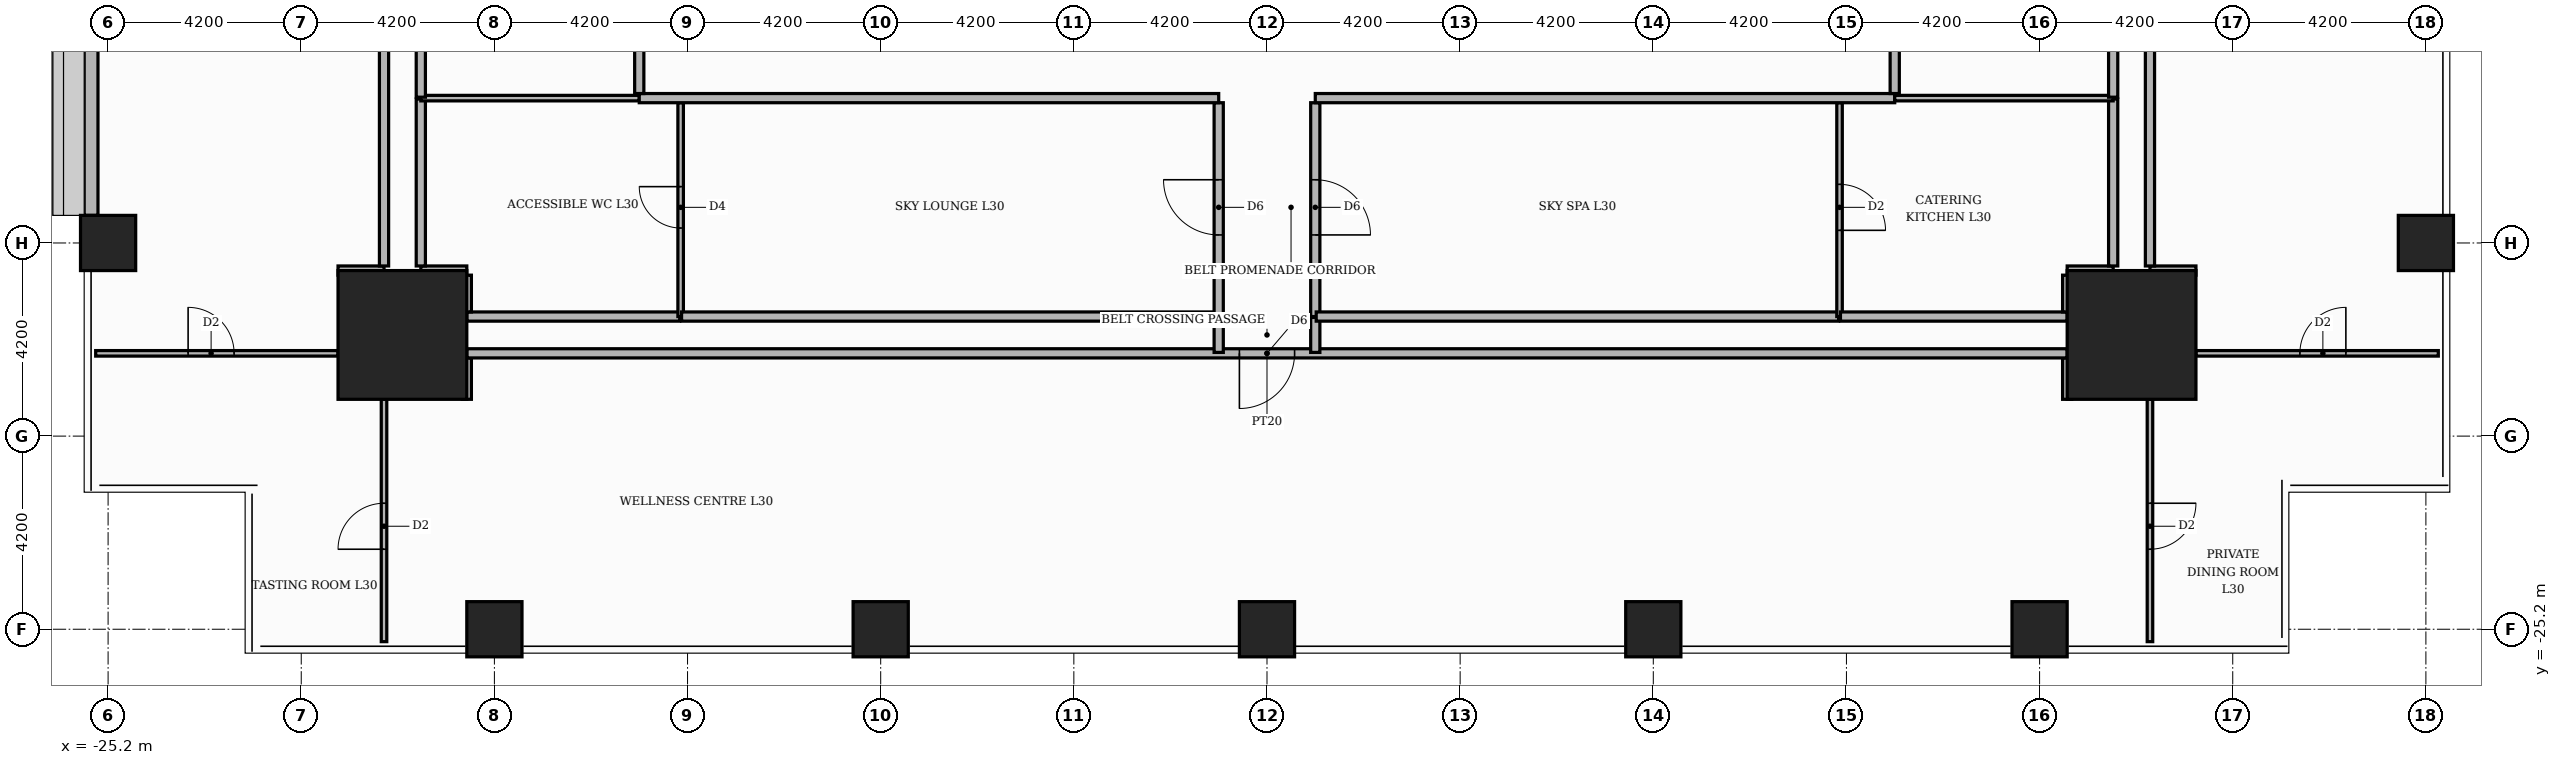
"""IFC4 building model, lengths in metres.
Left out: names, types, materials, properties, quantities, classifications, styles, units other than length and angle.
Written with IfcOpenShell. Run it as: python <this file> out.ifc"""

import sys

from ifc_helpers import new_model, si_unit, direction, frame, frame_2d, origin, origin_2d, place, context, subcontext, project, spatial, rectangle, extrude, element, fill, save


model = new_model("IFC4")
c1 = context("Model", 3, precision=1e-05, world=origin(), true_north=direction((0.0, 1.0)))
c2 = subcontext(c1, "Body", "Model", "MODEL_VIEW")
j1 = project(units=[si_unit("LENGTHUNIT", "METRE"), si_unit("PLANEANGLEUNIT", "RADIAN")], contexts=[c1])
p1 = place(None, origin())
s1 = spatial("IfcSite", under=j1, at=p1, CompositionType="ELEMENT")
p2 = place(p1, origin())
s2 = spatial("IfcBuilding", under=s1, at=p2, CompositionType="ELEMENT")
p3 = place(p2, frame((0.0, 0.0, 126.0)))
s3 = spatial("IfcBuildingStorey", under=s2, at=p3, CompositionType="ELEMENT", Elevation=126.0)
for number, where, z_axis, x_axis in (
    (1, (18.8, -18.8, 0.0), (0.0, 0.0, 1.0), (1.0, 0.0, 0.0)),
    (2, (-18.8, -18.8, 0.0), (0.0, 0.0, 1.0), (1.0, 0.0, 0.0)),
):
    element("IfcColumn", number, at=place(p3, frame(where, z_axis=z_axis, x_axis=x_axis)), inside=s3, PredefinedType="COLUMN", context=c2, shape_type="SweptSolid", body=[
        extrude(rectangle(XDim=2.8, YDim=2.8, at=origin_2d()), origin(), (0.0, 0.0, 1.0), 7.8),
    ])
for number, where, z_axis, x_axis in (
    (3, (25.2, -16.8, 0.0), (0.0, 0.0, 1.0), (1.0, 0.0, 0.0)),
    (4, (0.0, -25.2, 0.0), (0.0, 0.0, 1.0), (1.0, 0.0, 0.0)),
    (5, (8.4, -25.2, 0.0), (0.0, 0.0, 1.0), (1.0, 0.0, 0.0)),
    (6, (16.8, -25.2, 0.0), (0.0, 0.0, 1.0), (1.0, 0.0, 0.0)),
    (7, (-8.4, -25.2, 0.0), (0.0, 0.0, 1.0), (1.0, 0.0, 0.0)),
    (8, (-16.8, -25.2, 0.0), (0.0, 0.0, 1.0), (1.0, 0.0, 0.0)),
    (9, (-25.2, -16.8, 0.0), (0.0, 0.0, 1.0), (1.0, 0.0, 0.0)),
):
    element("IfcColumn", number, at=place(p3, frame(where, z_axis=z_axis, x_axis=x_axis)), inside=s3, PredefinedType="COLUMN", context=c2, shape_type="SweptSolid", body=[
        extrude(rectangle(XDim=1.2, YDim=1.2, at=origin_2d()), origin(), (0.0, 0.0, 1.0), 7.8),
    ])
p4 = place(p3, frame((-25.57, 16.2, 0.0), z_axis=(0.0, 0.0, 1.0), x_axis=(0.0, -1.0, 0.0)))
e10 = element("IfcWall", 10, at=p4, inside=s3, PredefinedType="STANDARD", context=c2, shape_type="SweptSolid", body=[
    extrude(rectangle(XDim=32.4, YDim=0.3, at=frame_2d((16.2, 0.0))), origin(), (0.0, 0.0, 1.0), 7.38),
])
p5 = place(p3, frame((-19.2, -25.47, 0.0), z_axis=(0.0, 0.0, 1.0), x_axis=(0.0, 1.0, 0.0)))
e11 = element("IfcWall", 11, at=p5, inside=s3, PredefinedType="PARTITIONING", context=c2, shape_type="SweptSolid", body=[
    extrude(rectangle(XDim=5.27, YDim=0.12, at=frame_2d((2.635, 0.0))), origin(), (0.0, 0.0, 1.0), 7.38),
])
p6 = place(p5, frame((2.01, 0.0, 0.0)))
e12 = element("IfcOpeningElement", 12, at=p6, cuts=e11, PredefinedType="OPENING", context=c2, shape_type="SweptSolid", body=[
    extrude(rectangle(XDim=1.0, YDim=2.1, at=frame_2d((0.5, 1.05))), frame((0.0, 0.07, 0.0), z_axis=(0.0, -1.0, 0.0), x_axis=(1.0, 0.0, 0.0)), (0.0, 0.0, 1.0), 0.14),
])
p7 = place(p3, frame((19.2, -25.47, 0.0), z_axis=(0.0, 0.0, 1.0), x_axis=(0.0, 1.0, 0.0)))
e13 = element("IfcWall", 13, at=p7, inside=s3, PredefinedType="PARTITIONING", context=c2, shape_type="SweptSolid", body=[
    extrude(rectangle(XDim=5.27, YDim=0.12, at=frame_2d((2.635, 0.0))), origin(), (0.0, 0.0, 1.0), 7.38),
])
p8 = place(p7, frame((2.01, 0.0, 0.0)))
e14 = element("IfcOpeningElement", 14, at=p8, cuts=e13, PredefinedType="OPENING", context=c2, shape_type="SweptSolid", body=[
    extrude(rectangle(XDim=1.0, YDim=2.1, at=frame_2d((0.5, 1.05))), frame((0.0, 0.07, 0.0), z_axis=(0.0, -1.0, 0.0), x_axis=(1.0, 0.0, 0.0)), (0.0, 0.0, 1.0), 0.14),
])
for number, where, z_axis, x_axis in (
    (15, (-17.4, -20.2, 0.0), (0.0, 0.0, 1.0), (0.0, 1.0, 0.0)),
    (16, (17.4, -20.2, 0.0), (0.0, 0.0, 1.0), (0.0, 1.0, 0.0)),
):
    element("IfcWall", number, at=place(p3, frame(where, z_axis=z_axis, x_axis=x_axis)), inside=s3, PredefinedType="PARTITIONING", context=c2, shape_type="SweptSolid", body=[
        extrude(rectangle(XDim=0.9, YDim=0.2, at=frame_2d((0.45, 0.0))), origin(), (0.0, 0.0, 1.0), 7.38),
    ])
p9 = place(p3, frame((-25.47, -19.2, 0.0), z_axis=(0.0, 0.0, 1.0), x_axis=(1.0, 0.0, 0.0)))
e17 = element("IfcWall", 17, at=p9, inside=s3, PredefinedType="PARTITIONING", context=c2, shape_type="SweptSolid", body=[
    extrude(rectangle(XDim=5.27, YDim=0.12, at=frame_2d((2.635, 0.0))), origin(), (0.0, 0.0, 1.0), 7.38),
])
p10 = place(p9, frame((2.01, 0.0, 0.0)))
e18 = element("IfcOpeningElement", 18, at=p10, cuts=e17, PredefinedType="OPENING", context=c2, shape_type="SweptSolid", body=[
    extrude(rectangle(XDim=1.0, YDim=2.1, at=frame_2d((0.5, 1.05))), frame((0.0, 0.07, 0.0), z_axis=(0.0, -1.0, 0.0), x_axis=(1.0, 0.0, 0.0)), (0.0, 0.0, 1.0), 0.14),
])
p11 = place(p3, frame((-17.4, -19.2, 0.0), z_axis=(0.0, 0.0, 1.0), x_axis=(1.0, 0.0, 0.0)))
e19 = element("IfcWall", 19, at=p11, inside=s3, PredefinedType="PARTITIONING", context=c2, shape_type="SweptSolid", body=[
    extrude(rectangle(XDim=34.8, YDim=0.2, at=frame_2d((17.4, 0.0))), origin(), (0.0, 0.0, 1.0), 7.38),
])
p12 = place(p11, frame((16.8, 0.0, 0.0)))
e20 = element("IfcOpeningElement", 20, at=p12, cuts=e19, PredefinedType="OPENING", context=c2, shape_type="SweptSolid", body=[
    extrude(rectangle(XDim=1.2, YDim=2.1, at=frame_2d((0.6, 1.05))), frame((0.0, 0.11, 0.0), z_axis=(0.0, -1.0, 0.0), x_axis=(1.0, 0.0, 0.0)), (0.0, 0.0, 1.0), 0.22),
])
p13 = place(p3, frame((20.2, -19.2, 0.0), z_axis=(0.0, 0.0, 1.0), x_axis=(1.0, 0.0, 0.0)))
e21 = element("IfcWall", 21, at=p13, inside=s3, PredefinedType="PARTITIONING", context=c2, shape_type="SweptSolid", body=[
    extrude(rectangle(XDim=5.27, YDim=0.12, at=frame_2d((2.635, 0.0))), origin(), (0.0, 0.0, 1.0), 7.38),
])
p14 = place(p13, frame((2.26, 0.0, 0.0)))
e22 = element("IfcOpeningElement", 22, at=p14, cuts=e21, PredefinedType="OPENING", context=c2, shape_type="SweptSolid", body=[
    extrude(rectangle(XDim=1.0, YDim=2.1, at=frame_2d((0.5, 1.05))), frame((0.0, 0.07, 0.0), z_axis=(0.0, -1.0, 0.0), x_axis=(1.0, 0.0, 0.0)), (0.0, 0.0, 1.0), 0.14),
])
for number, where, z_axis, x_axis in (
    (23, (-1.05, -19.18, 0.0), (0.0, 0.0, 1.0), (0.0, 1.0, 0.0)),
    (24, (1.05, -19.18, 0.0), (0.0, 0.0, 1.0), (0.0, 1.0, 0.0)),
):
    element("IfcWall", number, at=place(p3, frame(where, z_axis=z_axis, x_axis=x_axis)), inside=s3, PredefinedType="PARTITIONING", context=c2, shape_type="SweptSolid", body=[
        extrude(rectangle(XDim=0.76, YDim=0.2, at=frame_2d((0.38, 0.0))), origin(), (0.0, 0.0, 1.0), 7.38),
    ])
p15 = place(p3, frame((-17.4, -18.4, 0.0), z_axis=(0.0, 0.0, 1.0), x_axis=(1.0, 0.0, 0.0)))
e25 = element("IfcWall", 25, at=p15, inside=s3, PredefinedType="PARTITIONING", context=c2, shape_type="SweptSolid", body=[
    extrude(rectangle(XDim=4.63, YDim=0.2, at=frame_2d((2.315, 0.0))), origin(), (0.0, 0.0, 1.0), 7.38),
])
p16 = place(p3, frame((-12.75, -18.4, 0.0), z_axis=(0.0, 0.0, 1.0), x_axis=(0.0, 1.0, 0.0)))
e26 = element("IfcWall", 26, at=p16, inside=s3, PredefinedType="PARTITIONING", context=c2, shape_type="SweptSolid", body=[
    extrude(rectangle(XDim=4.65, YDim=0.12, at=frame_2d((2.325, 0.0))), origin(), (0.0, 0.0, 1.0), 7.38),
])
p17 = place(p16, frame((1.925, 0.0, 0.0)))
e27 = element("IfcOpeningElement", 27, at=p17, cuts=e26, PredefinedType="OPENING", context=c2, shape_type="SweptSolid", body=[
    extrude(rectangle(XDim=0.9, YDim=2.1, at=frame_2d((0.45, 1.05))), frame((0.0, 0.07, 0.0), z_axis=(0.0, -1.0, 0.0), x_axis=(1.0, 0.0, 0.0)), (0.0, 0.0, 1.0), 0.14),
])
p18 = place(p3, frame((-12.73, -18.4, 0.0), z_axis=(0.0, 0.0, 1.0), x_axis=(1.0, 0.0, 0.0)))
e28 = element("IfcWall", 28, at=p18, inside=s3, PredefinedType="PARTITIONING", context=c2, shape_type="SweptSolid", body=[
    extrude(rectangle(XDim=11.66, YDim=0.2, at=frame_2d((5.83, 0.0))), origin(), (0.0, 0.0, 1.0), 7.38),
])
p19 = place(p3, frame((-1.05, -18.4, 0.0), z_axis=(0.0, 0.0, 1.0), x_axis=(0.0, 1.0, 0.0)))
e29 = element("IfcWall", 29, at=p19, inside=s3, PredefinedType="PARTITIONING", context=c2, shape_type="SweptSolid", body=[
    extrude(rectangle(XDim=4.65, YDim=0.2, at=frame_2d((2.325, 0.0))), origin(), (0.0, 0.0, 1.0), 7.38),
])
p20 = place(p19, frame((1.775, 0.0, 0.0)))
e30 = element("IfcOpeningElement", 30, at=p20, cuts=e29, PredefinedType="OPENING", context=c2, shape_type="SweptSolid", body=[
    extrude(rectangle(XDim=1.2, YDim=2.1, at=frame_2d((0.6, 1.05))), frame((0.0, 0.11, 0.0), z_axis=(0.0, -1.0, 0.0), x_axis=(1.0, 0.0, 0.0)), (0.0, 0.0, 1.0), 0.22),
])
p21 = place(p3, frame((1.05, -18.4, 0.0), z_axis=(0.0, 0.0, 1.0), x_axis=(0.0, 1.0, 0.0)))
e31 = element("IfcWall", 31, at=p21, inside=s3, PredefinedType="PARTITIONING", context=c2, shape_type="SweptSolid", body=[
    extrude(rectangle(XDim=4.65, YDim=0.2, at=frame_2d((2.325, 0.0))), origin(), (0.0, 0.0, 1.0), 7.38),
])
p22 = place(p21, frame((1.775, 0.0, 0.0)))
e32 = element("IfcOpeningElement", 32, at=p22, cuts=e31, PredefinedType="OPENING", context=c2, shape_type="SweptSolid", body=[
    extrude(rectangle(XDim=1.2, YDim=2.1, at=frame_2d((0.6, 1.05))), frame((0.0, 0.11, 0.0), z_axis=(0.0, -1.0, 0.0), x_axis=(1.0, 0.0, 0.0)), (0.0, 0.0, 1.0), 0.22),
])
p23 = place(p3, frame((1.07, -18.4, 0.0), z_axis=(0.0, 0.0, 1.0), x_axis=(1.0, 0.0, 0.0)))
e33 = element("IfcWall", 33, at=p23, inside=s3, PredefinedType="PARTITIONING", context=c2, shape_type="SweptSolid", body=[
    extrude(rectangle(XDim=11.36, YDim=0.2, at=frame_2d((5.68, 0.0))), origin(), (0.0, 0.0, 1.0), 7.38),
])
p24 = place(p3, frame((12.45, -18.4, 0.0), z_axis=(0.0, 0.0, 1.0), x_axis=(0.0, 1.0, 0.0)))
e34 = element("IfcWall", 34, at=p24, inside=s3, PredefinedType="PARTITIONING", context=c2, shape_type="SweptSolid", body=[
    extrude(rectangle(XDim=4.65, YDim=0.12, at=frame_2d((2.325, 0.0))), origin(), (0.0, 0.0, 1.0), 7.38),
])
p25 = place(p24, frame((1.875, 0.0, 0.0)))
e35 = element("IfcOpeningElement", 35, at=p25, cuts=e34, PredefinedType="OPENING", context=c2, shape_type="SweptSolid", body=[
    extrude(rectangle(XDim=1.0, YDim=2.1, at=frame_2d((0.5, 1.05))), frame((0.0, 0.07, 0.0), z_axis=(0.0, -1.0, 0.0), x_axis=(1.0, 0.0, 0.0)), (0.0, 0.0, 1.0), 0.14),
])
p26 = place(p3, frame((12.47, -18.4, 0.0), z_axis=(0.0, 0.0, 1.0), x_axis=(1.0, 0.0, 0.0)))
e36 = element("IfcWall", 36, at=p26, inside=s3, PredefinedType="PARTITIONING", context=c2, shape_type="SweptSolid", body=[
    extrude(rectangle(XDim=4.93, YDim=0.2, at=frame_2d((2.465, 0.0))), origin(), (0.0, 0.0, 1.0), 7.38),
])
for number, where, z_axis, x_axis in (
    (37, (-17.4, -18.3, 0.0), (0.0, 0.0, 1.0), (0.0, 1.0, 0.0)),
    (38, (17.4, -18.3, 0.0), (0.0, 0.0, 1.0), (0.0, 1.0, 0.0)),
):
    element("IfcWall", number, at=place(p3, frame(where, z_axis=z_axis, x_axis=x_axis)), inside=s3, PredefinedType="PARTITIONING", context=c2, shape_type="SweptSolid", body=[
        extrude(rectangle(XDim=0.8, YDim=0.2, at=frame_2d((0.4, 0.0))), origin(), (0.0, 0.0, 1.0), 7.38),
    ])
for number, where, z_axis, x_axis in (
    (39, (-20.2, -17.4, 0.0), (0.0, 0.0, 1.0), (1.0, 0.0, 0.0)),
    (40, (-18.4, -17.4, 0.0), (0.0, 0.0, 1.0), (1.0, 0.0, 0.0)),
    (41, (17.4, -17.4, 0.0), (0.0, 0.0, 1.0), (1.0, 0.0, 0.0)),
    (42, (19.2, -17.4, 0.0), (0.0, 0.0, 1.0), (1.0, 0.0, 0.0)),
):
    element("IfcWall", number, at=place(p3, frame(where, z_axis=z_axis, x_axis=x_axis)), inside=s3, PredefinedType="PARTITIONING", context=c2, shape_type="SweptSolid", body=[
        extrude(rectangle(XDim=1.0, YDim=0.2, at=frame_2d((0.5, 0.0))), origin(), (0.0, 0.0, 1.0), 7.38),
    ])
p27 = place(p3, frame((-19.2, -17.3, 0.0), z_axis=(0.0, 0.0, 1.0), x_axis=(0.0, 1.0, 0.0)))
e43 = element("IfcWall", 43, at=p27, inside=s3, PredefinedType="PARTITIONING", context=c2, shape_type="SweptSolid", body=[
    extrude(rectangle(XDim=13.08, YDim=0.2, at=frame_2d((6.54, 0.0))), origin(), (0.0, 0.0, 1.0), 7.38),
])
for number, where, z_axis, x_axis in (
    (44, (-18.4, -17.3, 0.0), (0.0, 0.0, 1.0), (0.0, 1.0, 0.0)),
    (45, (18.4, -17.3, 0.0), (0.0, 0.0, 1.0), (0.0, 1.0, 0.0)),
):
    element("IfcWall", number, at=place(p3, frame(where, z_axis=z_axis, x_axis=x_axis)), inside=s3, PredefinedType="PARTITIONING", context=c2, shape_type="SweptSolid", body=[
        extrude(rectangle(XDim=3.63, YDim=0.2, at=frame_2d((1.815, 0.0))), origin(), (0.0, 0.0, 1.0), 7.38),
    ])
p28 = place(p3, frame((19.2, -17.3, 0.0), z_axis=(0.0, 0.0, 1.0), x_axis=(0.0, 1.0, 0.0)))
e46 = element("IfcWall", 46, at=p28, inside=s3, PredefinedType="PARTITIONING", context=c2, shape_type="SweptSolid", body=[
    extrude(rectangle(XDim=34.6, YDim=0.2, at=frame_2d((17.3, 0.0))), origin(), (0.0, 0.0, 1.0), 7.38),
])
p29 = place(p3, frame((-18.4, -13.65, 0.0), z_axis=(0.0, 0.0, 1.0), x_axis=(1.0, 0.0, 0.0)))
e47 = element("IfcWall", 47, at=p29, inside=s3, PredefinedType="PARTITIONING", context=c2, shape_type="SweptSolid", body=[
    extrude(rectangle(XDim=4.75, YDim=0.12, at=frame_2d((2.375, 0.0))), origin(), (0.0, 0.0, 1.0), 7.38),
])
for number, where, z_axis, x_axis in (
    (48, (-13.65, -13.65, 0.0), (0.0, 0.0, 1.0), (1.0, 0.0, 0.0)),
    (49, (1.05, -13.65, 0.0), (0.0, 0.0, 1.0), (1.0, 0.0, 0.0)),
):
    element("IfcWall", number, at=place(p3, frame(where, z_axis=z_axis, x_axis=x_axis)), inside=s3, PredefinedType="PARTITIONING", context=c2, shape_type="SweptSolid", body=[
        extrude(rectangle(XDim=12.6, YDim=0.2, at=frame_2d((6.3, 0.0))), origin(), (0.0, 0.0, 1.0), 7.38),
    ])
p30 = place(p3, frame((13.65, -13.65, 0.0), z_axis=(0.0, 0.0, 1.0), x_axis=(1.0, 0.0, 0.0)))
e50 = element("IfcWall", 50, at=p30, inside=s3, PredefinedType="PARTITIONING", context=c2, shape_type="SweptSolid", body=[
    extrude(rectangle(XDim=4.75, YDim=0.12, at=frame_2d((2.375, 0.0))), origin(), (0.0, 0.0, 1.0), 7.38),
])
p31 = place(p3, frame((-18.4, -13.63, 0.0), z_axis=(0.0, 0.0, 1.0), x_axis=(0.0, 1.0, 0.0)))
e51 = element("IfcWall", 51, at=p31, inside=s3, PredefinedType="PARTITIONING", context=c2, shape_type="SweptSolid", body=[
    extrude(rectangle(XDim=30.93, YDim=0.2, at=frame_2d((15.465, 0.0))), origin(), (0.0, 0.0, 1.0), 7.38),
])
p32 = place(p3, frame((18.4, -13.63, 0.0), z_axis=(0.0, 0.0, 1.0), x_axis=(0.0, 1.0, 0.0)))
e52 = element("IfcWall", 52, at=p32, inside=s3, PredefinedType="PARTITIONING", context=c2, shape_type="SweptSolid", body=[
    extrude(rectangle(XDim=12.41, YDim=0.2, at=frame_2d((6.205, 0.0))), origin(), (0.0, 0.0, 1.0), 7.38),
])
p33 = place(p3, frame((-13.65, -13.55, 0.0), z_axis=(0.0, 0.0, 1.0), x_axis=(0.0, 1.0, 0.0)))
e53 = element("IfcWall", 53, at=p33, inside=s3, PredefinedType="PARTITIONING", context=c2, shape_type="SweptSolid", body=[
    extrude(rectangle(XDim=27.1, YDim=0.2, at=frame_2d((13.55, 0.0))), origin(), (0.0, 0.0, 1.0), 7.38),
])
p34 = place(p3, frame((13.65, -13.55, 0.0), z_axis=(0.0, 0.0, 1.0), x_axis=(0.0, 1.0, 0.0)))
e54 = element("IfcWall", 54, at=p34, inside=s3, PredefinedType="PARTITIONING", context=c2, shape_type="SweptSolid", body=[
    extrude(rectangle(XDim=27.1, YDim=0.2, at=frame_2d((13.55, 0.0))), origin(), (0.0, 0.0, 1.0), 7.38),
])
p35 = place(p34, frame((5.525, 0.0, 0.0)))
e55 = element("IfcOpeningElement", 55, at=p35, cuts=e54, PredefinedType="OPENING", context=c2, shape_type="SweptSolid", body=[
    extrude(rectangle(XDim=1.2, YDim=2.1, at=frame_2d((0.6, 1.05))), frame((0.0, 0.11, 0.0), z_axis=(0.0, -1.0, 0.0), x_axis=(1.0, 0.0, 0.0)), (0.0, 0.0, 1.0), 0.22),
])
p36 = place(p20, origin())
e56 = element("IfcDoor", 56, at=p36, inside=s3, OperationType="SINGLE_SWING_RIGHT", PredefinedType="DOOR", context=c2, shape_type="SweptSolid", body=[
    extrude(rectangle(XDim=1.2, YDim=2.1, at=frame_2d((0.6, 1.05))), frame((0.0, 0.025, 0.0), z_axis=(0.0, -1.0, 0.0), x_axis=(1.0, 0.0, 0.0)), (0.0, 0.0, 1.0), 0.05),
])
fill(e30, e56)
p37 = place(p22, frame((1.2, 0.0, 0.0), z_axis=(0.0, 0.0, 1.0), x_axis=(-1.0, 0.0, 0.0)))
e57 = element("IfcDoor", 57, at=p37, inside=s3, OperationType="SINGLE_SWING_LEFT", PredefinedType="DOOR", context=c2, shape_type="SweptSolid", body=[
    extrude(rectangle(XDim=1.2, YDim=2.1, at=frame_2d((0.6, 1.05))), frame((0.0, 0.025, 0.0), z_axis=(0.0, -1.0, 0.0), x_axis=(1.0, 0.0, 0.0)), (0.0, 0.0, 1.0), 0.05),
])
fill(e32, e57)
p38 = place(p25, frame((1.0, 0.0, 0.0), z_axis=(0.0, 0.0, 1.0), x_axis=(-1.0, 0.0, 0.0)))
e58 = element("IfcDoor", 58, at=p38, inside=s3, OperationType="SINGLE_SWING_LEFT", PredefinedType="DOOR", context=c2, shape_type="SweptSolid", body=[
    extrude(rectangle(XDim=1.0, YDim=2.1, at=frame_2d((0.5, 1.05))), frame((0.0, 0.025, 0.0), z_axis=(0.0, -1.0, 0.0), x_axis=(1.0, 0.0, 0.0)), (0.0, 0.0, 1.0), 0.05),
])
fill(e35, e58)
p39 = place(p17, origin())
e59 = element("IfcDoor", 59, at=p39, inside=s3, OperationType="SINGLE_SWING_RIGHT", PredefinedType="DOOR", context=c2, shape_type="SweptSolid", body=[
    extrude(rectangle(XDim=0.9, YDim=2.1, at=frame_2d((0.45, 1.05))), frame((0.0, 0.025, 0.0), z_axis=(0.0, -1.0, 0.0), x_axis=(1.0, 0.0, 0.0)), (0.0, 0.0, 1.0), 0.05),
])
fill(e27, e59)
p40 = place(p12, frame((1.2, 0.0, 0.0), z_axis=(0.0, 0.0, 1.0), x_axis=(-1.0, 0.0, 0.0)))
e60 = element("IfcDoor", 60, at=p40, inside=s3, OperationType="SINGLE_SWING_LEFT", PredefinedType="DOOR", context=c2, shape_type="SweptSolid", body=[
    extrude(rectangle(XDim=1.2, YDim=2.1, at=frame_2d((0.6, 1.05))), frame((0.0, 0.025, 0.0), z_axis=(0.0, -1.0, 0.0), x_axis=(1.0, 0.0, 0.0)), (0.0, 0.0, 1.0), 0.05),
])
fill(e20, e60)
p41 = place(p8, frame((1.0, 0.0, 0.0), z_axis=(0.0, 0.0, 1.0), x_axis=(-1.0, 0.0, 0.0)))
e61 = element("IfcDoor", 61, at=p41, inside=s3, OperationType="SINGLE_SWING_RIGHT", PredefinedType="DOOR", context=c2, shape_type="SweptSolid", body=[
    extrude(rectangle(XDim=1.0, YDim=2.1, at=frame_2d((0.5, 1.05))), frame((0.0, 0.025, 0.0), z_axis=(0.0, -1.0, 0.0), x_axis=(1.0, 0.0, 0.0)), (0.0, 0.0, 1.0), 0.05),
])
fill(e14, e61)
p42 = place(p6, origin())
e62 = element("IfcDoor", 62, at=p42, inside=s3, OperationType="SINGLE_SWING_LEFT", PredefinedType="DOOR", context=c2, shape_type="SweptSolid", body=[
    extrude(rectangle(XDim=1.0, YDim=2.1, at=frame_2d((0.5, 1.05))), frame((0.0, 0.025, 0.0), z_axis=(0.0, -1.0, 0.0), x_axis=(1.0, 0.0, 0.0)), (0.0, 0.0, 1.0), 0.05),
])
fill(e12, e62)
p43 = place(p14, origin())
e63 = element("IfcDoor", 63, at=p43, inside=s3, OperationType="SINGLE_SWING_RIGHT", PredefinedType="DOOR", context=c2, shape_type="SweptSolid", body=[
    extrude(rectangle(XDim=1.0, YDim=2.1, at=frame_2d((0.5, 1.05))), frame((0.0, 0.025, 0.0), z_axis=(0.0, -1.0, 0.0), x_axis=(1.0, 0.0, 0.0)), (0.0, 0.0, 1.0), 0.05),
])
fill(e22, e63)
p44 = place(p10, origin())
e64 = element("IfcDoor", 64, at=p44, inside=s3, OperationType="SINGLE_SWING_LEFT", PredefinedType="DOOR", context=c2, shape_type="SweptSolid", body=[
    extrude(rectangle(XDim=1.0, YDim=2.1, at=frame_2d((0.5, 1.05))), frame((0.0, 0.025, 0.0), z_axis=(0.0, -1.0, 0.0), x_axis=(1.0, 0.0, 0.0)), (0.0, 0.0, 1.0), 0.05),
])
fill(e18, e64)
save(model, sys.argv[1])
